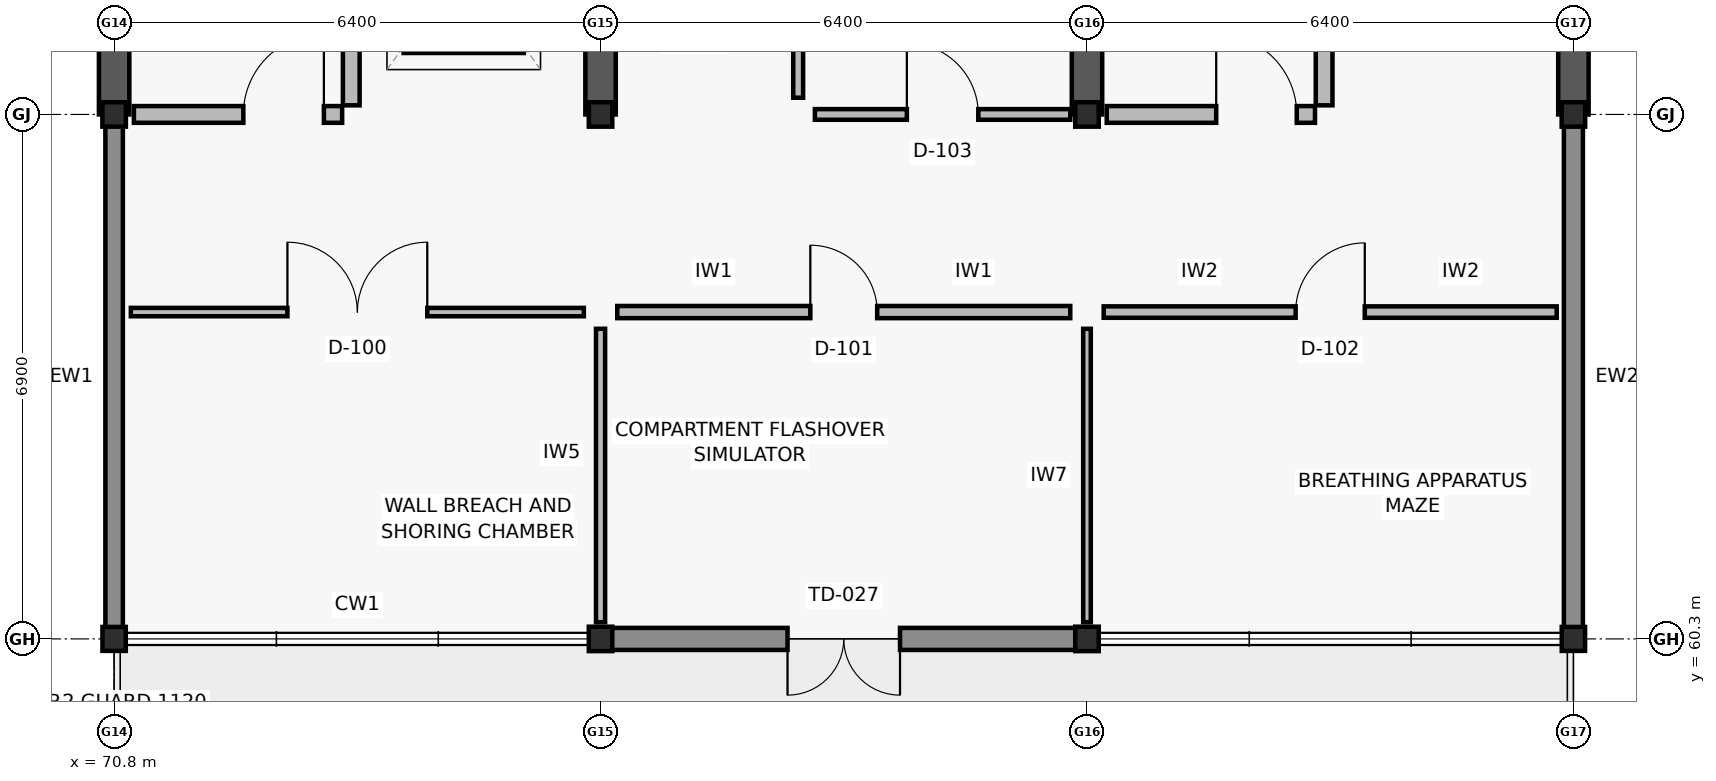
"""IFC4 building model, lengths in metres.
Left out: names, types, materials, properties, quantities, classifications, styles, units other than length and angle.
Written with IfcOpenShell. Run it as: python <this file> out.ifc"""

import sys

from ifc_helpers import new_model, si_unit, direction, frame, frame_2d, origin, origin_2d, place, context, subcontext, project, spatial, rectangle, i_section, extrude, element, fill, save


model = new_model("IFC4")
c1 = context("Model", 3, precision=1e-05, world=origin(), true_north=direction((0.0, 1.0)))
c2 = subcontext(c1, "Body", "Model", "MODEL_VIEW")
j1 = project(units=[si_unit("LENGTHUNIT", "METRE"), si_unit("PLANEANGLEUNIT", "RADIAN")], contexts=[c1])
p1 = place(None, origin())
s1 = spatial("IfcSite", under=j1, at=p1, CompositionType="ELEMENT")
p2 = place(p1, origin())
s2 = spatial("IfcBuilding", under=s1, at=p2, CompositionType="ELEMENT")
p3 = place(p2, frame((0.0, 0.0, 9.6)))
s3 = spatial("IfcBuildingStorey", under=s2, at=p3, CompositionType="ELEMENT", Elevation=9.6)
p4 = place(p3, frame((70.8, 60.3, 0.0), z_axis=(0.0, 0.0, 1.0), x_axis=(1.0, 0.0, 0.0)))
e1 = element("IfcColumn", 1, at=p4, inside=s3, PredefinedType="COLUMN", context=c2, shape_type="SweptSolid", body=[
    extrude(i_section(OverallWidth=0.307, OverallDepth=0.315, WebThickness=0.012, FlangeThickness=0.019, FilletRadius=0.017, at=origin_2d()), origin(), (0.0, 0.0, 1.0), 3.9),
])
for number, where, z_axis, x_axis in (
    (2, (70.8, 67.2, 0.0), (0.0, 0.0, 1.0), (1.0, 0.0, 0.0)),
    (3, (77.2, 60.3, 0.0), (0.0, 0.0, 1.0), (1.0, 0.0, 0.0)),
    (4, (77.2, 67.2, 0.0), (0.0, 0.0, 1.0), (1.0, 0.0, 0.0)),
    (5, (83.6, 60.3, 0.0), (0.0, 0.0, 1.0), (1.0, 0.0, 0.0)),
    (6, (83.6, 67.2, 0.0), (0.0, 0.0, 1.0), (1.0, 0.0, 0.0)),
):
    element("IfcColumn", number, at=place(p3, frame(where, z_axis=z_axis, x_axis=x_axis)), inside=s3, PredefinedType="COLUMN", context=c2, shape_type="SweptSolid", body=[
        extrude(i_section(OverallWidth=0.309, OverallDepth=0.321, WebThickness=0.014, FlangeThickness=0.022, FilletRadius=0.017, at=origin_2d()), origin(), (0.0, 0.0, 1.0), 3.9),
    ])
p5 = place(p3, frame((90.0, 60.3, 0.0), z_axis=(0.0, 0.0, 1.0), x_axis=(1.0, 0.0, 0.0)))
e7 = element("IfcColumn", 7, at=p5, inside=s3, PredefinedType="COLUMN", context=c2, shape_type="SweptSolid", body=[
    extrude(i_section(OverallWidth=0.307, OverallDepth=0.315, WebThickness=0.012, FlangeThickness=0.019, FilletRadius=0.017, at=origin_2d()), origin(), (0.0, 0.0, 1.0), 3.9),
])
p6 = place(p3, frame((90.0, 67.2, 0.0), z_axis=(0.0, 0.0, 1.0), x_axis=(1.0, 0.0, 0.0)))
e8 = element("IfcColumn", 8, at=p6, inside=s3, PredefinedType="COLUMN", context=c2, shape_type="SweptSolid", body=[
    extrude(i_section(OverallWidth=0.309, OverallDepth=0.321, WebThickness=0.014, FlangeThickness=0.022, FilletRadius=0.017, at=origin_2d()), origin(), (0.0, 0.0, 1.0), 3.9),
])
for number, where, z_axis, x_axis in (
    (9, (70.8, 67.2, 0.0), (0.0, 0.0, 1.0), (0.0, 1.0, 0.0)),
    (10, (77.2, 67.2, 0.0), (0.0, 0.0, 1.0), (0.0, 1.0, 0.0)),
    (11, (83.6, 67.2, 0.0), (0.0, 0.0, 1.0), (0.0, 1.0, 0.0)),
    (12, (90.0, 67.2, 0.0), (0.0, 0.0, 1.0), (0.0, 1.0, 0.0)),
):
    element("IfcWall", number, at=place(p3, frame(where, z_axis=z_axis, x_axis=x_axis)), inside=s3, PredefinedType="SHEAR", context=c2, shape_type="SweptSolid", body=[
        extrude(rectangle(XDim=6.7, YDim=0.4, at=frame_2d((3.35, 0.0))), origin(), (0.0, 0.0, 1.0), 3.66),
    ])
p7 = place(p3, frame((83.595, 60.3, 0.0), z_axis=(0.0, 0.0, 1.0), x_axis=(-1.0, 0.0, 0.0)))
e13 = element("IfcWall", 13, at=p7, inside=s3, PredefinedType="SOLIDWALL", context=c2, shape_type="SweptSolid", body=[
    extrude(rectangle(XDim=6.39, YDim=0.29, at=frame_2d((3.195, 0.0))), origin(), (0.0, 0.0, 1.0), 3.02),
])
p8 = place(p7, frame((2.455, 0.0, 0.0)))
e14 = element("IfcOpeningElement", 14, at=p8, cuts=e13, PredefinedType="OPENING", context=c2, shape_type="SweptSolid", body=[
    extrude(rectangle(XDim=1.48, YDim=2.16, at=frame_2d((0.74, 1.08))), frame((0.0, 0.155, 0.0), z_axis=(0.0, -1.0, 0.0), x_axis=(1.0, 0.0, 0.0)), (0.0, 0.0, 1.0), 0.31),
])
p9 = place(p3, frame((70.8, 60.305, 0.0), z_axis=(0.0, 0.0, 1.0), x_axis=(0.0, 1.0, 0.0)))
e15 = element("IfcWall", 15, at=p9, inside=s3, PredefinedType="SOLIDWALL", context=c2, shape_type="SweptSolid", body=[
    extrude(rectangle(XDim=6.89, YDim=0.23, at=frame_2d((3.445, 0.0))), origin(), (0.0, 0.0, 1.0), 3.02),
])
p10 = place(p3, frame((90.0, 67.195, 0.0), z_axis=(0.0, 0.0, 1.0), x_axis=(0.0, -1.0, 0.0)))
e16 = element("IfcWall", 16, at=p10, inside=s3, PredefinedType="SOLIDWALL", context=c2, shape_type="SweptSolid", body=[
    extrude(rectangle(XDim=6.89, YDim=0.25, at=frame_2d((3.445, 0.0))), origin(), (0.0, 0.0, 1.0), 3.02),
])
p11 = place(p3, frame((73.92, 67.32, 0.0), z_axis=(0.0, 0.0, 1.0), x_axis=(0.0, 1.0, 0.0)))
e17 = element("IfcWall", 17, at=p11, inside=s3, PredefinedType="SOLIDWALL", context=c2, shape_type="SweptSolid", body=[
    extrude(rectangle(XDim=6.555, YDim=0.22, at=frame_2d((3.277, 0.0))), origin(), (0.0, 0.0, 1.0), 3.66),
])
p12 = place(p3, frame((71.06, 67.2, 0.0), z_axis=(0.0, 0.0, 1.0), x_axis=(1.0, 0.0, 0.0)))
e18 = element("IfcWall", 18, at=p12, inside=s3, PredefinedType="SOLIDWALL", context=c2, shape_type="SweptSolid", body=[
    extrude(rectangle(XDim=2.74, YDim=0.22, at=frame_2d((1.37, 0.0))), origin(), (0.0, 0.0, 1.0), 3.02),
])
p13 = place(p12, frame((1.44, 0.0, 0.0)))
e19 = element("IfcOpeningElement", 19, at=p13, cuts=e18, PredefinedType="OPENING", context=c2, shape_type="SweptSolid", body=[
    extrude(rectangle(XDim=1.06, YDim=2.1, at=frame_2d((0.53, 1.05))), frame((0.0, 0.12, 0.0), z_axis=(0.0, -1.0, 0.0), x_axis=(1.0, 0.0, 0.0)), (0.0, 0.0, 1.0), 0.24),
])
p14 = place(p3, frame((86.72, 67.32, 0.0), z_axis=(0.0, 0.0, 1.0), x_axis=(0.0, 1.0, 0.0)))
e20 = element("IfcWall", 20, at=p14, inside=s3, PredefinedType="SOLIDWALL", context=c2, shape_type="SweptSolid", body=[
    extrude(rectangle(XDim=6.555, YDim=0.22, at=frame_2d((3.277, 0.0))), origin(), (0.0, 0.0, 1.0), 3.66),
])
p15 = place(p3, frame((83.86, 67.2, 0.0), z_axis=(0.0, 0.0, 1.0), x_axis=(1.0, 0.0, 0.0)))
e21 = element("IfcWall", 21, at=p15, inside=s3, PredefinedType="SOLIDWALL", context=c2, shape_type="SweptSolid", body=[
    extrude(rectangle(XDim=2.74, YDim=0.22, at=frame_2d((1.37, 0.0))), origin(), (0.0, 0.0, 1.0), 3.02),
])
p16 = place(p15, frame((1.44, 0.0, 0.0)))
e22 = element("IfcOpeningElement", 22, at=p16, cuts=e21, PredefinedType="OPENING", context=c2, shape_type="SweptSolid", body=[
    extrude(rectangle(XDim=1.06, YDim=2.1, at=frame_2d((0.53, 1.05))), frame((0.0, 0.12, 0.0), z_axis=(0.0, -1.0, 0.0), x_axis=(1.0, 0.0, 0.0)), (0.0, 0.0, 1.0), 0.24),
])
p17 = place(p3, frame((77.2, 60.52, 0.0), z_axis=(0.0, 0.0, 1.0), x_axis=(0.0, 1.0, 0.0)))
e23 = element("IfcWall", 23, at=p17, inside=s3, PredefinedType="PARTITIONING", context=c2, shape_type="SweptSolid", body=[
    extrude(rectangle(XDim=3.86, YDim=0.12, at=frame_2d((1.93, 0.0))), origin(), (0.0, 0.0, 1.0), 3.0),
])
p18 = place(p3, frame((71.02, 64.6, 0.0), z_axis=(0.0, 0.0, 1.0), x_axis=(1.0, 0.0, 0.0)))
e24 = element("IfcWall", 24, at=p18, inside=s3, PredefinedType="PARTITIONING", context=c2, shape_type="SweptSolid", body=[
    extrude(rectangle(XDim=5.96, YDim=0.11, at=frame_2d((2.98, 0.0))), origin(), (0.0, 0.0, 1.0), 3.0),
])
p19 = place(p18, frame((2.06, 0.0, 0.0)))
e25 = element("IfcOpeningElement", 25, at=p19, cuts=e24, PredefinedType="OPENING", context=c2, shape_type="SweptSolid", body=[
    extrude(rectangle(XDim=1.84, YDim=2.22, at=frame_2d((0.92, 1.11))), frame((0.0, 0.065, 0.0), z_axis=(0.0, -1.0, 0.0), x_axis=(1.0, 0.0, 0.0)), (0.0, 0.0, 1.0), 0.13),
])
p20 = place(p3, frame((83.6, 60.52, 0.0), z_axis=(0.0, 0.0, 1.0), x_axis=(0.0, 1.0, 0.0)))
e26 = element("IfcWall", 26, at=p20, inside=s3, PredefinedType="PARTITIONING", context=c2, shape_type="SweptSolid", body=[
    extrude(rectangle(XDim=3.86, YDim=0.1, at=frame_2d((1.93, 0.0))), origin(), (0.0, 0.0, 1.0), 3.0),
])
p21 = place(p3, frame((77.42, 64.6, 0.0), z_axis=(0.0, 0.0, 1.0), x_axis=(1.0, 0.0, 0.0)))
e27 = element("IfcWall", 27, at=p21, inside=s3, PredefinedType="PARTITIONING", context=c2, shape_type="SweptSolid", body=[
    extrude(rectangle(XDim=5.96, YDim=0.16, at=frame_2d((2.98, 0.0))), origin(), (0.0, 0.0, 1.0), 3.0),
])
p22 = place(p21, frame((2.54, 0.0, 0.0)))
e28 = element("IfcOpeningElement", 28, at=p22, cuts=e27, PredefinedType="OPENING", context=c2, shape_type="SweptSolid", body=[
    extrude(rectangle(XDim=0.88, YDim=2.04, at=frame_2d((0.44, 1.02))), frame((0.0, 0.09, 0.0), z_axis=(0.0, -1.0, 0.0), x_axis=(1.0, 0.0, 0.0)), (0.0, 0.0, 1.0), 0.18),
])
p23 = place(p3, frame((83.82, 64.6, 0.0), z_axis=(0.0, 0.0, 1.0), x_axis=(1.0, 0.0, 0.0)))
e29 = element("IfcWall", 29, at=p23, inside=s3, PredefinedType="PARTITIONING", context=c2, shape_type="SweptSolid", body=[
    extrude(rectangle(XDim=5.96, YDim=0.15, at=frame_2d((2.98, 0.0))), origin(), (0.0, 0.0, 1.0), 3.0),
])
p24 = place(p23, frame((2.525, 0.0, 0.0)))
e30 = element("IfcOpeningElement", 30, at=p24, cuts=e29, PredefinedType="OPENING", context=c2, shape_type="SweptSolid", body=[
    extrude(rectangle(XDim=0.91, YDim=2.06, at=frame_2d((0.455, 1.03))), frame((0.0, 0.085, 0.0), z_axis=(0.0, -1.0, 0.0), x_axis=(1.0, 0.0, 0.0)), (0.0, 0.0, 1.0), 0.17),
])
p25 = place(p3, frame((80.02, 67.2, 0.0), z_axis=(0.0, 0.0, 1.0), x_axis=(1.0, 0.0, 0.0)))
e31 = element("IfcWall", 31, at=p25, inside=s3, PredefinedType="PARTITIONING", context=c2, shape_type="SweptSolid", body=[
    extrude(rectangle(XDim=3.36, YDim=0.14, at=frame_2d((1.68, 0.0))), origin(), (0.0, 0.0, 1.0), 3.0),
])
p26 = place(p25, frame((1.21, 0.0, 0.0)))
e32 = element("IfcOpeningElement", 32, at=p26, cuts=e31, PredefinedType="OPENING", context=c2, shape_type="SweptSolid", body=[
    extrude(rectangle(XDim=0.94, YDim=2.08, at=frame_2d((0.47, 1.04))), frame((0.0, 0.08, 0.0), z_axis=(0.0, -1.0, 0.0), x_axis=(1.0, 0.0, 0.0)), (0.0, 0.0, 1.0), 0.16),
])
p27 = place(p3, frame((79.8, 67.42, 0.0), z_axis=(0.0, 0.0, 1.0), x_axis=(0.0, 1.0, 0.0)))
e33 = element("IfcWall", 33, at=p27, inside=s3, PredefinedType="PARTITIONING", context=c2, shape_type="SweptSolid", body=[
    extrude(rectangle(XDim=6.46, YDim=0.13, at=frame_2d((3.23, 0.0))), origin(), (0.0, 0.0, 1.0), 3.0),
])
p28 = place(p27, frame((2.745, 0.0, 0.0)))
e34 = element("IfcOpeningElement", 34, at=p28, cuts=e33, PredefinedType="OPENING", context=c2, shape_type="SweptSolid", body=[
    extrude(rectangle(XDim=0.97, YDim=2.1, at=frame_2d((0.485, 1.05))), frame((0.0, 0.075, 0.0), z_axis=(0.0, -1.0, 0.0), x_axis=(1.0, 0.0, 0.0)), (0.0, 0.0, 1.0), 0.15),
])
p29 = place(p8, origin())
e35 = element("IfcDoor", 35, at=p29, inside=s3, OperationType="DOUBLE_DOOR_SINGLE_SWING", PredefinedType="DOOR", context=c2, shape_type="SweptSolid", body=[
    extrude(rectangle(XDim=1.48, YDim=2.16, at=frame_2d((0.74, 1.08))), frame((0.0, 0.025, 0.0), z_axis=(0.0, -1.0, 0.0), x_axis=(1.0, 0.0, 0.0)), (0.0, 0.0, 1.0), 0.05),
])
fill(e14, e35)
p30 = place(p13, origin())
e36 = element("IfcDoor", 36, at=p30, inside=s3, OperationType="SINGLE_SWING_RIGHT", PredefinedType="DOOR", context=c2, shape_type="SweptSolid", body=[
    extrude(rectangle(XDim=1.06, YDim=2.1, at=frame_2d((0.53, 1.05))), frame((0.0, 0.025, 0.0), z_axis=(0.0, -1.0, 0.0), x_axis=(1.0, 0.0, 0.0)), (0.0, 0.0, 1.0), 0.05),
])
fill(e19, e36)
p31 = place(p16, origin())
e37 = element("IfcDoor", 37, at=p31, inside=s3, OperationType="SINGLE_SWING_LEFT", PredefinedType="DOOR", context=c2, shape_type="SweptSolid", body=[
    extrude(rectangle(XDim=1.06, YDim=2.1, at=frame_2d((0.53, 1.05))), frame((0.0, 0.025, 0.0), z_axis=(0.0, -1.0, 0.0), x_axis=(1.0, 0.0, 0.0)), (0.0, 0.0, 1.0), 0.05),
])
fill(e22, e37)
p32 = place(p19, origin())
e38 = element("IfcDoor", 38, at=p32, inside=s3, OperationType="DOUBLE_DOOR_SINGLE_SWING", PredefinedType="DOOR", context=c2, shape_type="SweptSolid", body=[
    extrude(rectangle(XDim=1.84, YDim=2.22, at=frame_2d((0.92, 1.11))), frame((0.0, 0.025, 0.0), z_axis=(0.0, -1.0, 0.0), x_axis=(1.0, 0.0, 0.0)), (0.0, 0.0, 1.0), 0.05),
])
fill(e25, e38)
p33 = place(p22, origin())
e39 = element("IfcDoor", 39, at=p33, inside=s3, OperationType="SINGLE_SWING_LEFT", PredefinedType="DOOR", context=c2, shape_type="SweptSolid", body=[
    extrude(rectangle(XDim=0.88, YDim=2.04, at=frame_2d((0.44, 1.02))), frame((0.0, 0.025, 0.0), z_axis=(0.0, -1.0, 0.0), x_axis=(1.0, 0.0, 0.0)), (0.0, 0.0, 1.0), 0.05),
])
fill(e28, e39)
p34 = place(p24, origin())
e40 = element("IfcDoor", 40, at=p34, inside=s3, OperationType="SINGLE_SWING_RIGHT", PredefinedType="DOOR", context=c2, shape_type="SweptSolid", body=[
    extrude(rectangle(XDim=0.91, YDim=2.06, at=frame_2d((0.455, 1.03))), frame((0.0, 0.025, 0.0), z_axis=(0.0, -1.0, 0.0), x_axis=(1.0, 0.0, 0.0)), (0.0, 0.0, 1.0), 0.05),
])
fill(e30, e40)
p35 = place(p26, origin())
e41 = element("IfcDoor", 41, at=p35, inside=s3, OperationType="SINGLE_SWING_LEFT", PredefinedType="DOOR", context=c2, shape_type="SweptSolid", body=[
    extrude(rectangle(XDim=0.94, YDim=2.08, at=frame_2d((0.47, 1.04))), frame((0.0, 0.025, 0.0), z_axis=(0.0, -1.0, 0.0), x_axis=(1.0, 0.0, 0.0)), (0.0, 0.0, 1.0), 0.05),
])
fill(e32, e41)
save(model, sys.argv[1])
